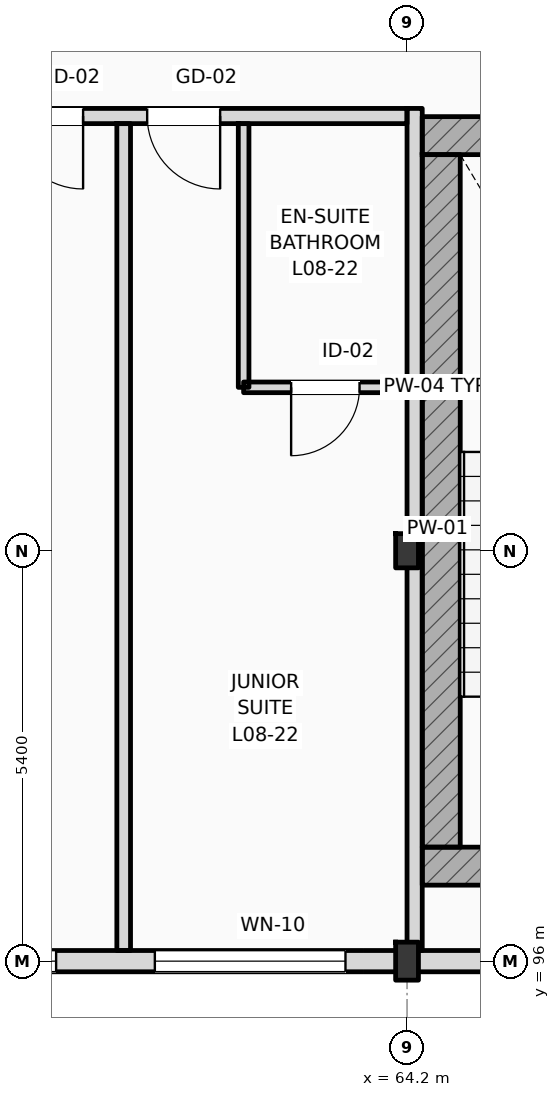
"""IFC4 building model, lengths in metres.
Left out: names, types, materials, properties, quantities, classifications, styles, units other than length and angle.
Written with IfcOpenShell. Run it as: python <this file> out.ifc"""

import sys

from ifc_helpers import new_model, si_unit, direction, frame, frame_2d, origin, origin_2d, place, context, subcontext, project, spatial, rectangle, i_section, extrude, element, fill, save


model = new_model("IFC4")
c1 = context("Model", 3, precision=1e-05, world=origin(), true_north=direction((0.0, 1.0)))
c2 = subcontext(c1, "Body", "Model", "MODEL_VIEW")
j1 = project(units=[si_unit("LENGTHUNIT", "METRE"), si_unit("PLANEANGLEUNIT", "RADIAN")], contexts=[c1])
p1 = place(None, origin())
s1 = spatial("IfcSite", under=j1, at=p1, CompositionType="ELEMENT")
p2 = place(p1, origin())
s2 = spatial("IfcBuilding", under=s1, at=p2, CompositionType="ELEMENT")
p3 = place(p2, frame((0.0, 0.0, 35.4)))
s3 = spatial("IfcBuildingStorey", under=s2, at=p3, CompositionType="ELEMENT", Elevation=35.4)
p4 = place(p3, frame((64.2, 96.0, 0.0), z_axis=(0.0, 0.0, 1.0), x_axis=(1.0, 0.0, 0.0)))
e1 = element("IfcColumn", 1, at=p4, inside=s3, PredefinedType="COLUMN", context=c2, shape_type="SweptSolid", body=[
    extrude(i_section(OverallWidth=0.3, OverallDepth=0.5, WebThickness=0.014, FlangeThickness=0.028, FilletRadius=0.027, at=origin_2d()), origin(), (0.0, 0.0, 1.0), 3.6),
])
p5 = place(p3, frame((64.2, 101.4, 0.0), z_axis=(0.0, 0.0, 1.0), x_axis=(1.0, 0.0, 0.0)))
e2 = element("IfcColumn", 2, at=p5, inside=s3, PredefinedType="COLUMN", context=c2, shape_type="SweptSolid", body=[
    extrude(i_section(OverallWidth=0.3, OverallDepth=0.45, WebThickness=0.014, FlangeThickness=0.026, FilletRadius=0.027, at=origin_2d()), origin(), (0.0, 0.0, 1.0), 3.6),
])
for number, where, z_axis, x_axis in (
    (3, (64.4, 106.862, 0.0), (0.0, 0.0, 1.0), (1.0, 0.0, 0.0)),
    (4, (64.4, 97.25, 0.0), (0.0, 0.0, 1.0), (1.0, 0.0, 0.0)),
):
    element("IfcWall", number, at=place(p3, frame(where, z_axis=z_axis, x_axis=x_axis)), inside=s3, PredefinedType="SHEAR", context=c2, shape_type="SweptSolid", body=[
        extrude(rectangle(XDim=5.16, YDim=0.5, at=frame_2d((2.58, 0.0))), origin(), (0.0, 0.0, 1.0), 3.6),
    ])
p6 = place(p3, frame((64.65, 97.5, 0.0), z_axis=(0.0, 0.0, 1.0), x_axis=(0.0, 1.0, 0.0)))
e5 = element("IfcWall", 5, at=p6, inside=s3, PredefinedType="SHEAR", context=c2, shape_type="SweptSolid", body=[
    extrude(rectangle(XDim=9.112, YDim=0.5, at=frame_2d((4.556, 0.0))), origin(), (0.0, 0.0, 1.0), 3.6),
])
p7 = place(p3, frame((25.2, 96.0, 0.0), z_axis=(0.0, 0.0, 1.0), x_axis=(1.0, 0.0, 0.0)))
e6 = element("IfcWall", 6, at=p7, inside=s3, PredefinedType="STANDARD", context=c2, shape_type="SweptSolid", body=[
    extrude(rectangle(XDim=70.2, YDim=0.28, at=frame_2d((35.1, 0.0))), origin(), (0.0, 0.0, 1.0), 2.92),
])
p8 = place(p7, frame((16.694, 0.0, 0.9)))
e7 = element("IfcOpeningElement", 7, at=p8, cuts=e6, PredefinedType="OPENING", context=c2, shape_type="SweptSolid", body=[
    extrude(rectangle(XDim=1.8, YDim=1.84, at=frame_2d((0.9, 0.92))), frame((0.0, 0.15, 0.0), z_axis=(0.0, -1.0, 0.0), x_axis=(1.0, 0.0, 0.0)), (0.0, 0.0, 1.0), 0.3),
])
p9 = place(p7, frame((20.482, 0.0, 0.9)))
e8 = element("IfcOpeningElement", 8, at=p9, cuts=e6, PredefinedType="OPENING", context=c2, shape_type="SweptSolid", body=[
    extrude(rectangle(XDim=1.95, YDim=1.84, at=frame_2d((0.975, 0.92))), frame((0.0, 0.15, 0.0), z_axis=(0.0, -1.0, 0.0), x_axis=(1.0, 0.0, 0.0)), (0.0, 0.0, 1.0), 0.3),
])
p10 = place(p7, frame((24.316, 0.0, 0.9)))
e9 = element("IfcOpeningElement", 9, at=p10, cuts=e6, PredefinedType="OPENING", context=c2, shape_type="SweptSolid", body=[
    extrude(rectangle(XDim=2.1, YDim=1.84, at=frame_2d((1.05, 0.92))), frame((0.0, 0.15, 0.0), z_axis=(0.0, -1.0, 0.0), x_axis=(1.0, 0.0, 0.0)), (0.0, 0.0, 1.0), 0.3),
])
p11 = place(p7, frame((28.149, 0.0, 0.9)))
e10 = element("IfcOpeningElement", 10, at=p11, cuts=e6, PredefinedType="OPENING", context=c2, shape_type="SweptSolid", body=[
    extrude(rectangle(XDim=2.25, YDim=1.84, at=frame_2d((1.125, 0.92))), frame((0.0, 0.15, 0.0), z_axis=(0.0, -1.0, 0.0), x_axis=(1.0, 0.0, 0.0)), (0.0, 0.0, 1.0), 0.3),
])
p12 = place(p7, frame((31.983, 0.0, 0.9)))
e11 = element("IfcOpeningElement", 11, at=p12, cuts=e6, PredefinedType="OPENING", context=c2, shape_type="SweptSolid", body=[
    extrude(rectangle(XDim=2.4, YDim=1.84, at=frame_2d((1.2, 0.92))), frame((0.0, 0.15, 0.0), z_axis=(0.0, -1.0, 0.0), x_axis=(1.0, 0.0, 0.0)), (0.0, 0.0, 1.0), 0.3),
])
p13 = place(p7, frame((35.682, 0.0, 0.9)))
e12 = element("IfcOpeningElement", 12, at=p13, cuts=e6, PredefinedType="OPENING", context=c2, shape_type="SweptSolid", body=[
    extrude(rectangle(XDim=2.508, YDim=1.84, at=frame_2d((1.254, 0.92))), frame((0.0, 0.15, 0.0), z_axis=(0.0, -1.0, 0.0), x_axis=(1.0, 0.0, 0.0)), (0.0, 0.0, 1.0), 0.3),
])
p14 = place(p7, frame((55.56, 0.0, 0.9)))
e13 = element("IfcOpeningElement", 13, at=p14, cuts=e6, PredefinedType="OPENING", context=c2, shape_type="SweptSolid", body=[
    extrude(rectangle(XDim=1.8, YDim=1.84, at=frame_2d((0.9, 0.92))), frame((0.0, 0.15, 0.0), z_axis=(0.0, -1.0, 0.0), x_axis=(1.0, 0.0, 0.0)), (0.0, 0.0, 1.0), 0.3),
])
p15 = place(p7, frame((58.628, 0.0, 0.9)))
e14 = element("IfcOpeningElement", 14, at=p15, cuts=e6, PredefinedType="OPENING", context=c2, shape_type="SweptSolid", body=[
    extrude(rectangle(XDim=2.809, YDim=1.84, at=frame_2d((1.405, 0.92))), frame((0.0, 0.15, 0.0), z_axis=(0.0, -1.0, 0.0), x_axis=(1.0, 0.0, 0.0)), (0.0, 0.0, 1.0), 0.3),
])
p16 = place(p7, frame((63.257, 0.0, 0.9)))
e15 = element("IfcOpeningElement", 15, at=p16, cuts=e6, PredefinedType="OPENING", context=c2, shape_type="SweptSolid", body=[
    extrude(rectangle(XDim=1.8, YDim=1.84, at=frame_2d((0.9, 0.92))), frame((0.0, 0.15, 0.0), z_axis=(0.0, -1.0, 0.0), x_axis=(1.0, 0.0, 0.0)), (0.0, 0.0, 1.0), 0.3),
])
p17 = place(p7, frame((66.453, 0.0, 0.9)))
e16 = element("IfcOpeningElement", 16, at=p17, cuts=e6, PredefinedType="OPENING", context=c2, shape_type="SweptSolid", body=[
    extrude(rectangle(XDim=2.737, YDim=1.84, at=frame_2d((1.369, 0.92))), frame((0.0, 0.15, 0.0), z_axis=(0.0, -1.0, 0.0), x_axis=(1.0, 0.0, 0.0)), (0.0, 0.0, 1.0), 0.3),
])
p18 = place(p3, frame((40.76, 107.12, 0.0), z_axis=(0.0, 0.0, 1.0), x_axis=(1.0, 0.0, 0.0)))
e17 = element("IfcWall", 17, at=p18, inside=s3, PredefinedType="PARTITIONING", context=c2, shape_type="SweptSolid", body=[
    extrude(rectangle(XDim=23.44, YDim=0.2, at=frame_2d((11.72, 0.0))), origin(), (0.0, 0.0, 1.0), 3.38),
])
p19 = place(p18, frame((2.629, 0.0, 0.0)))
e18 = element("IfcOpeningElement", 18, at=p19, cuts=e17, PredefinedType="OPENING", context=c2, shape_type="SweptSolid", body=[
    extrude(rectangle(XDim=0.96, YDim=2.2, at=frame_2d((0.48, 1.1))), frame((0.0, 0.11, 0.0), z_axis=(0.0, -1.0, 0.0), x_axis=(1.0, 0.0, 0.0)), (0.0, 0.0, 1.0), 0.22),
])
p20 = place(p18, frame((4.343, 0.0, 0.0)))
e19 = element("IfcOpeningElement", 19, at=p20, cuts=e17, PredefinedType="OPENING", context=c2, shape_type="SweptSolid", body=[
    extrude(rectangle(XDim=0.96, YDim=2.2, at=frame_2d((0.48, 1.1))), frame((0.0, 0.11, 0.0), z_axis=(0.0, -1.0, 0.0), x_axis=(1.0, 0.0, 0.0)), (0.0, 0.0, 1.0), 0.22),
])
p21 = place(p18, frame((10.401, 0.0, 0.0)))
e20 = element("IfcOpeningElement", 20, at=p21, cuts=e17, PredefinedType="OPENING", context=c2, shape_type="SweptSolid", body=[
    extrude(rectangle(XDim=0.96, YDim=2.2, at=frame_2d((0.48, 1.1))), frame((0.0, 0.11, 0.0), z_axis=(0.0, -1.0, 0.0), x_axis=(1.0, 0.0, 0.0)), (0.0, 0.0, 1.0), 0.22),
])
p22 = place(p18, frame((12.159, 0.0, 0.0)))
e21 = element("IfcOpeningElement", 21, at=p22, cuts=e17, PredefinedType="OPENING", context=c2, shape_type="SweptSolid", body=[
    extrude(rectangle(XDim=0.96, YDim=2.2, at=frame_2d((0.48, 1.1))), frame((0.0, 0.11, 0.0), z_axis=(0.0, -1.0, 0.0), x_axis=(1.0, 0.0, 0.0)), (0.0, 0.0, 1.0), 0.22),
])
p23 = place(p18, frame((18.218, 0.0, 0.0)))
e22 = element("IfcOpeningElement", 22, at=p23, cuts=e17, PredefinedType="OPENING", context=c2, shape_type="SweptSolid", body=[
    extrude(rectangle(XDim=0.96, YDim=2.2, at=frame_2d((0.48, 1.1))), frame((0.0, 0.11, 0.0), z_axis=(0.0, -1.0, 0.0), x_axis=(1.0, 0.0, 0.0)), (0.0, 0.0, 1.0), 0.22),
])
p24 = place(p18, frame((20.021, 0.0, 0.0)))
e23 = element("IfcOpeningElement", 23, at=p24, cuts=e17, PredefinedType="OPENING", context=c2, shape_type="SweptSolid", body=[
    extrude(rectangle(XDim=0.96, YDim=2.2, at=frame_2d((0.48, 1.1))), frame((0.0, 0.11, 0.0), z_axis=(0.0, -1.0, 0.0), x_axis=(1.0, 0.0, 0.0)), (0.0, 0.0, 1.0), 0.22),
])
p25 = place(p3, frame((64.3, 96.14, 0.0), z_axis=(0.0, 0.0, 1.0), x_axis=(0.0, 1.0, 0.0)))
e24 = element("IfcWall", 24, at=p25, inside=s3, PredefinedType="PARTITIONING", context=c2, shape_type="SweptSolid", body=[
    extrude(rectangle(XDim=11.08, YDim=0.2, at=frame_2d((5.54, 0.0))), origin(), (0.0, 0.0, 1.0), 3.01),
])
p26 = place(p3, frame((60.472, 96.14, 0.0), z_axis=(0.0, 0.0, 1.0), x_axis=(0.0, 1.0, 0.0)))
e25 = element("IfcWall", 25, at=p26, inside=s3, PredefinedType="PARTITIONING", context=c2, shape_type="SweptSolid", body=[
    extrude(rectangle(XDim=10.88, YDim=0.18, at=frame_2d((5.44, 0.0))), origin(), (0.0, 0.0, 1.0), 3.38),
])
p27 = place(p3, frame((62.05, 103.55, 0.0), z_axis=(0.0, 0.0, 1.0), x_axis=(0.0, 1.0, 0.0)))
e26 = element("IfcWall", 26, at=p27, inside=s3, PredefinedType="PARTITIONING", context=c2, shape_type="SweptSolid", body=[
    extrude(rectangle(XDim=3.47, YDim=0.14, at=frame_2d((1.735, 0.0))), origin(), (0.0, 0.0, 1.0), 3.38),
])
p28 = place(p3, frame((62.05, 103.55, 0.0), z_axis=(0.0, 0.0, 1.0), x_axis=(1.0, 0.0, 0.0)))
e27 = element("IfcWall", 27, at=p28, inside=s3, PredefinedType="PARTITIONING", context=c2, shape_type="SweptSolid", body=[
    extrude(rectangle(XDim=2.15, YDim=0.14, at=frame_2d((1.075, 0.0))), origin(), (0.0, 0.0, 1.0), 3.38),
])
p29 = place(p28, frame((0.625, 0.0, 0.0)))
e28 = element("IfcOpeningElement", 28, at=p29, cuts=e27, PredefinedType="OPENING", context=c2, shape_type="SweptSolid", body=[
    extrude(rectangle(XDim=0.9, YDim=2.1, at=frame_2d((0.45, 1.05))), frame((0.0, 0.08, 0.0), z_axis=(0.0, -1.0, 0.0), x_axis=(1.0, 0.0, 0.0)), (0.0, 0.0, 1.0), 0.16),
])
p30 = place(p12, origin())
e29 = element("IfcWindow", 29, at=p30, inside=s3, PartitioningType="DOUBLE_PANEL_VERTICAL", PredefinedType="WINDOW", context=c2, shape_type="SweptSolid", body=[
    extrude(rectangle(XDim=2.4, YDim=1.84, at=frame_2d((1.2, 0.92))), frame((0.0, 0.03, 0.0), z_axis=(0.0, -1.0, 0.0), x_axis=(1.0, 0.0, 0.0)), (0.0, 0.0, 1.0), 0.06),
])
fill(e11, e29)
p31 = place(p13, origin())
e30 = element("IfcWindow", 30, at=p31, inside=s3, PartitioningType="DOUBLE_PANEL_VERTICAL", PredefinedType="WINDOW", context=c2, shape_type="SweptSolid", body=[
    extrude(rectangle(XDim=2.508, YDim=1.84, at=frame_2d((1.254, 0.92))), frame((0.0, 0.03, 0.0), z_axis=(0.0, -1.0, 0.0), x_axis=(1.0, 0.0, 0.0)), (0.0, 0.0, 1.0), 0.06),
])
fill(e12, e30)
p32 = place(p23, frame((0.96, 0.0, 0.0), z_axis=(0.0, 0.0, 1.0), x_axis=(-1.0, 0.0, 0.0)))
e31 = element("IfcDoor", 31, at=p32, inside=s3, OperationType="SINGLE_SWING_RIGHT", PredefinedType="DOOR", context=c2, shape_type="SweptSolid", body=[
    extrude(rectangle(XDim=0.96, YDim=2.2, at=frame_2d((0.48, 1.1))), frame((0.0, 0.025, 0.0), z_axis=(0.0, -1.0, 0.0), x_axis=(1.0, 0.0, 0.0)), (0.0, 0.0, 1.0), 0.05),
])
fill(e22, e31)
p33 = place(p24, frame((0.96, 0.0, 0.0), z_axis=(0.0, 0.0, 1.0), x_axis=(-1.0, 0.0, 0.0)))
e32 = element("IfcDoor", 32, at=p33, inside=s3, OperationType="SINGLE_SWING_RIGHT", PredefinedType="DOOR", context=c2, shape_type="SweptSolid", body=[
    extrude(rectangle(XDim=0.96, YDim=2.2, at=frame_2d((0.48, 1.1))), frame((0.0, 0.025, 0.0), z_axis=(0.0, -1.0, 0.0), x_axis=(1.0, 0.0, 0.0)), (0.0, 0.0, 1.0), 0.05),
])
fill(e23, e32)
p34 = place(p29, frame((0.9, 0.0, 0.0), z_axis=(0.0, 0.0, 1.0), x_axis=(-1.0, 0.0, 0.0)))
e33 = element("IfcDoor", 33, at=p34, inside=s3, OperationType="SINGLE_SWING_LEFT", PredefinedType="DOOR", context=c2, shape_type="SweptSolid", body=[
    extrude(rectangle(XDim=0.9, YDim=2.1, at=frame_2d((0.45, 1.05))), frame((0.0, 0.025, 0.0), z_axis=(0.0, -1.0, 0.0), x_axis=(1.0, 0.0, 0.0)), (0.0, 0.0, 1.0), 0.05),
])
fill(e28, e33)
save(model, sys.argv[1])
